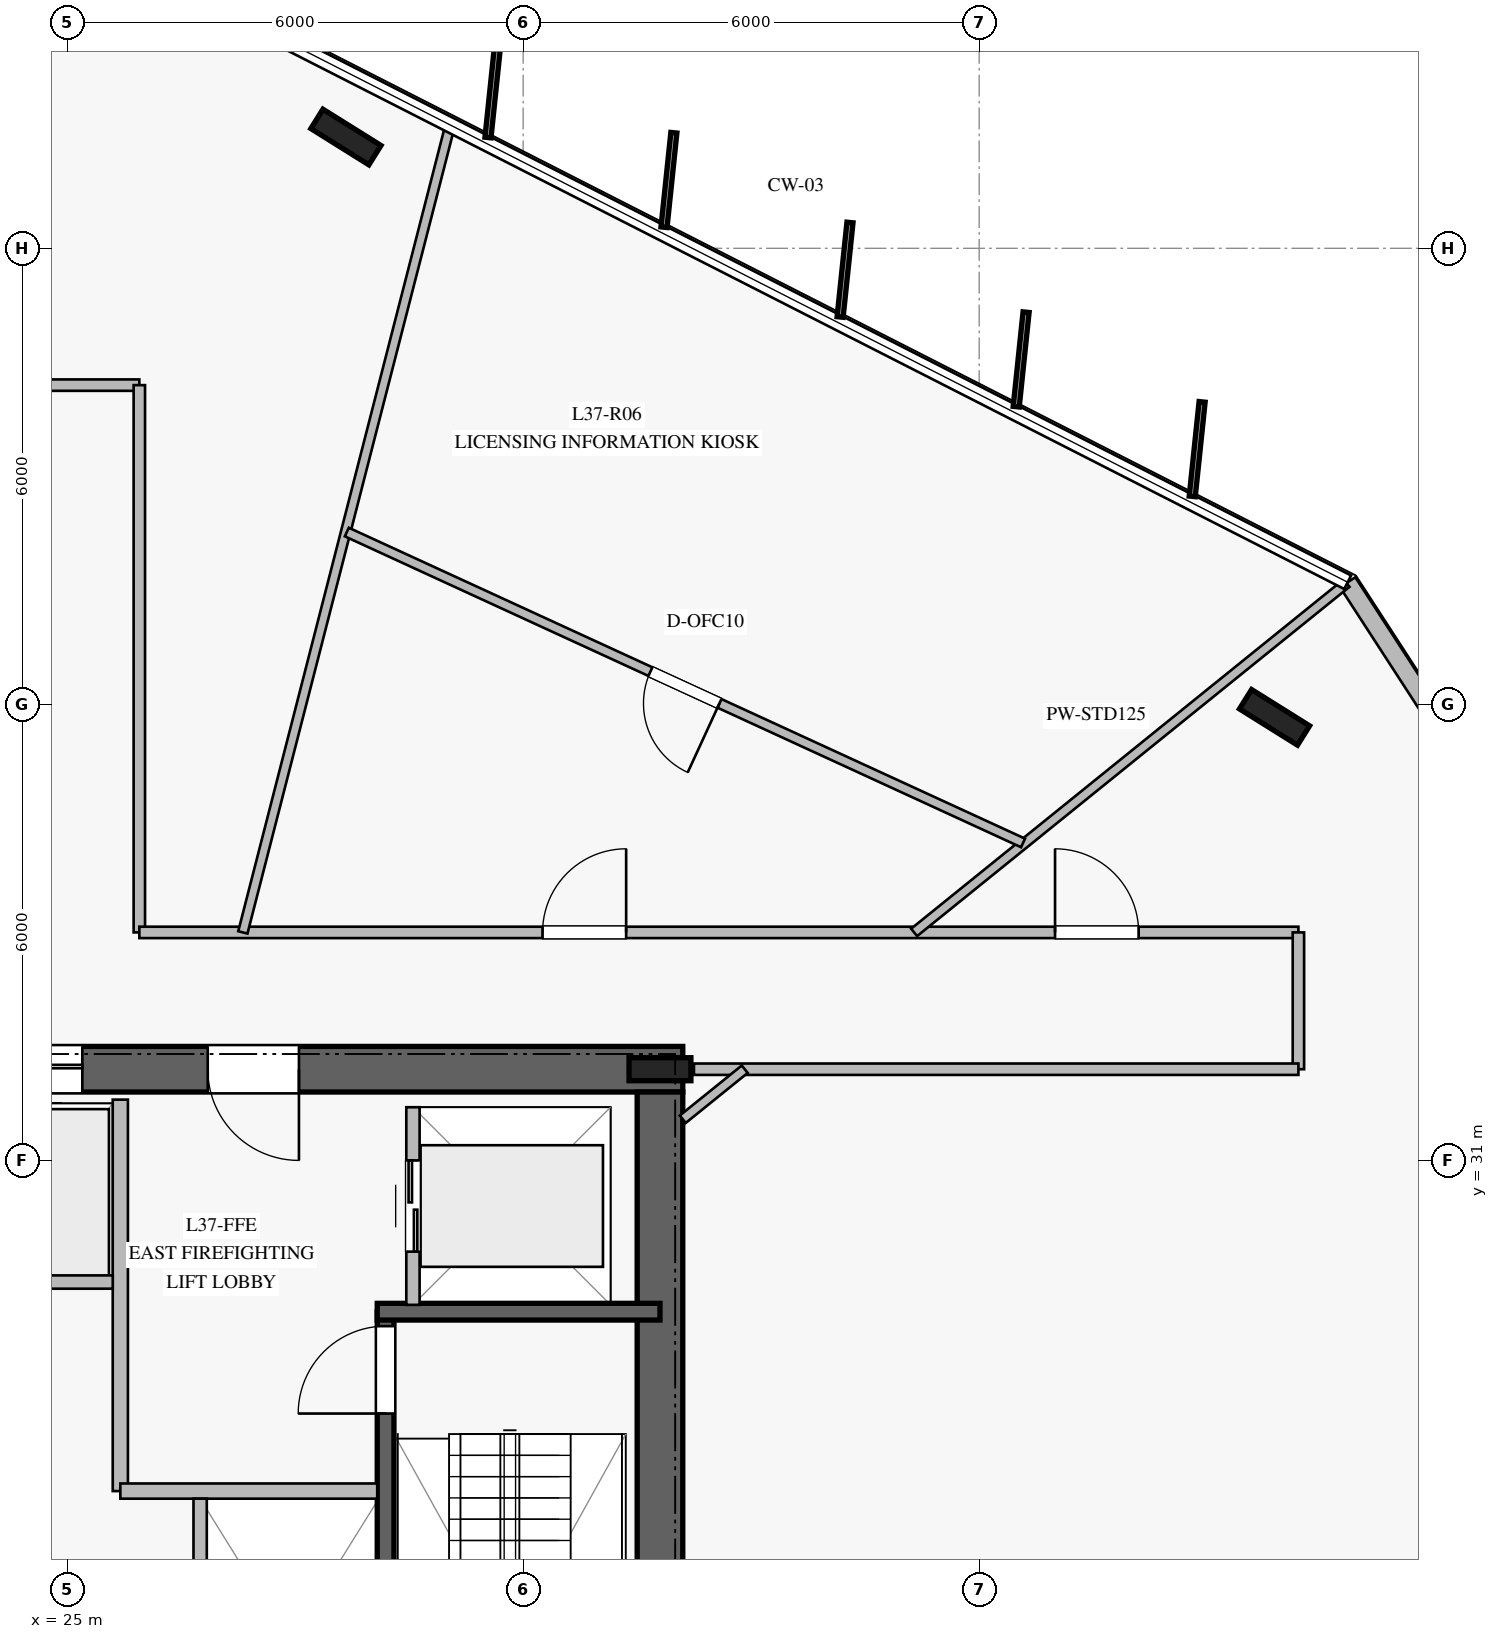
"""IFC4 building model, lengths in metres.
Left out: names, types, materials, properties, quantities, classifications, styles, units other than length and angle.
Written with IfcOpenShell. Run it as: python <this file> out.ifc"""

import sys

from ifc_helpers import new_model, si_unit, direction, frame, frame_2d, origin, origin_2d, place, context, subcontext, project, spatial, rectangle, i_section, extrude, element, fill, save


model = new_model("IFC4")
c1 = context("Model", 3, precision=1e-05, world=origin(), true_north=direction((0.0, 1.0)))
c2 = subcontext(c1, "Body", "Model", "MODEL_VIEW")
j1 = project(units=[si_unit("LENGTHUNIT", "METRE"), si_unit("PLANEANGLEUNIT", "RADIAN")], contexts=[c1])
p1 = place(None, origin())
s1 = spatial("IfcSite", under=j1, at=p1, CompositionType="ELEMENT")
p2 = place(p1, origin())
s2 = spatial("IfcBuilding", under=s1, at=p2, CompositionType="ELEMENT")
p3 = place(p2, frame((0.0, 0.0, 154.4)))
s3 = spatial("IfcBuildingStorey", under=s2, at=p3, CompositionType="ELEMENT", Elevation=154.4)
p4 = place(p3, frame((33.1, 32.2, 0.0), z_axis=(0.0, 0.0, 1.0), x_axis=(-1.0, 0.0, 0.0)))
e1 = element("IfcWall", 1, at=p4, inside=s3, PredefinedType="SHEAR", context=c2, shape_type="SweptSolid", body=[
    extrude(rectangle(XDim=16.2, YDim=0.6, at=frame_2d((8.1, 0.0))), origin(), (0.0, 0.0, 1.0), 3.76),
])
p5 = place(p4, frame((5.05, 0.0, 0.0)))
e2 = element("IfcOpeningElement", 2, at=p5, cuts=e1, PredefinedType="OPENING", context=c2, shape_type="SweptSolid", body=[
    extrude(rectangle(XDim=1.2, YDim=2.25, at=frame_2d((0.6, 1.125))), frame((0.0, 0.31, 0.0), z_axis=(0.0, -1.0, 0.0), x_axis=(1.0, 0.0, 0.0)), (0.0, 0.0, 1.0), 0.62),
])
p6 = place(p4, frame((11.85, 0.0, 0.0)))
e3 = element("IfcOpeningElement", 3, at=p6, cuts=e1, PredefinedType="OPENING", context=c2, shape_type="SweptSolid", body=[
    extrude(rectangle(XDim=1.1, YDim=2.2, at=frame_2d((0.55, 1.1))), frame((0.0, 0.31, 0.0), z_axis=(0.0, -1.0, 0.0), x_axis=(1.0, 0.0, 0.0)), (0.0, 0.0, 1.0), 0.62),
])
p7 = place(p4, frame((9.875, 0.0, 0.0)))
e4 = element("IfcOpeningElement", 4, at=p7, cuts=e1, PredefinedType="OPENING", context=c2, shape_type="SweptSolid", body=[
    extrude(rectangle(XDim=1.1, YDim=2.2, at=frame_2d((0.55, 1.1))), frame((0.0, 0.31, 0.0), z_axis=(0.0, -1.0, 0.0), x_axis=(1.0, 0.0, 0.0)), (0.0, 0.0, 1.0), 0.62),
])
p8 = place(p4, frame((7.9, 0.0, 0.0)))
e5 = element("IfcOpeningElement", 5, at=p8, cuts=e1, PredefinedType="OPENING", context=c2, shape_type="SweptSolid", body=[
    extrude(rectangle(XDim=1.1, YDim=2.2, at=frame_2d((0.55, 1.1))), frame((0.0, 0.31, 0.0), z_axis=(0.0, -1.0, 0.0), x_axis=(1.0, 0.0, 0.0)), (0.0, 0.0, 1.0), 0.62),
])
p9 = place(p3, frame((32.8, 18.1, 0.0), z_axis=(0.0, 0.0, 1.0), x_axis=(0.0, 1.0, 0.0)))
e6 = element("IfcWall", 6, at=p9, inside=s3, PredefinedType="SHEAR", context=c2, shape_type="SweptSolid", body=[
    extrude(rectangle(XDim=13.8, YDim=0.6, at=frame_2d((6.9, 0.0))), origin(), (0.0, 0.0, 1.0), 3.76),
])
p10 = place(p3, frame((32.8, 32.2, 0.0), z_axis=(0.0, 0.0, 1.0), x_axis=(1.0, 0.0, 0.0)))
e7 = element("IfcColumn", 7, at=p10, inside=s3, PredefinedType="COLUMN", context=c2, shape_type="SweptSolid", body=[
    extrude(i_section(OverallWidth=0.303, OverallDepth=0.814, WebThickness=0.021, FlangeThickness=0.04, at=origin_2d()), origin(), (0.0, 0.0, 1.0), 4.0),
])
p11 = place(p3, frame((29.19, 21.79, 0.0), z_axis=(0.0, 0.0, 1.0), x_axis=(0.0, 1.0, 0.0)))
e8 = element("IfcWall", 8, at=p11, inside=s3, PredefinedType="SOLIDWALL", context=c2, shape_type="SweptSolid", body=[
    extrude(rectangle(XDim=7.22, YDim=0.22, at=frame_2d((3.61, 0.0))), origin(), (0.0, 0.0, 1.0), 3.76),
])
p12 = place(p11, frame((5.88, 0.0, 0.0)))
e9 = element("IfcOpeningElement", 9, at=p12, cuts=e8, PredefinedType="OPENING", context=c2, shape_type="SweptSolid", body=[
    extrude(rectangle(XDim=1.15, YDim=2.2, at=frame_2d((0.575, 1.1))), frame((0.0, 0.12, 0.0), z_axis=(0.0, -1.0, 0.0), x_axis=(1.0, 0.0, 0.0)), (0.0, 0.0, 1.0), 0.24),
])
p13 = place(p3, frame((29.08, 29.01, 0.0), z_axis=(0.0, 0.0, 1.0), x_axis=(1.0, 0.0, 0.0)))
e10 = element("IfcWall", 10, at=p13, inside=s3, PredefinedType="SOLIDWALL", context=c2, shape_type="SweptSolid", body=[
    extrude(rectangle(XDim=3.72, YDim=0.22, at=frame_2d((1.86, 0.0))), origin(), (0.0, 0.0, 1.0), 3.76),
])
for number, where, z_axis, x_axis in (
    (11, (40.886, 36.829, 0.0), (0.0, 0.0, 1.0), (-0.848, 0.53, 0.0)),
    (12, (28.668, 44.464, 0.0), (0.0, 0.0, 1.0), (-0.848, 0.53, 0.0)),
):
    element("IfcColumn", number, at=place(p3, frame(where, z_axis=z_axis, x_axis=x_axis)), inside=s3, PredefinedType="COLUMN", context=c2, shape_type="SweptSolid", body=[
        extrude(i_section(OverallWidth=0.3, OverallDepth=0.9, WebThickness=0.019, FlangeThickness=0.035, at=origin_2d()), origin(), (0.0, 0.0, 1.0), 4.0),
    ])
p14 = place(p3, frame((44.282, 34.856, 0.0), z_axis=(0.0, 0.0, 1.0), x_axis=(-0.544351046129, 0.838857519832, 0.0)))
e13 = element("IfcWall", 13, at=p14, inside=s3, PredefinedType="STANDARD", context=c2, shape_type="SweptSolid", body=[
    extrude(rectangle(XDim=4.471, YDim=0.24, at=frame_2d((2.236, 0.0))), origin(), (0.0, 0.0, 1.0), 3.76),
])
p15 = place(p3, frame((25.7, 26.65, 0.0), z_axis=(0.0, 0.0, 1.0), x_axis=(0.0, 1.0, 0.0)))
e14 = element("IfcWall", 14, at=p15, inside=s3, PredefinedType="PARTITIONING", context=c2, shape_type="SweptSolid", body=[
    extrude(rectangle(XDim=5.15, YDim=0.2, at=frame_2d((2.575, 0.0))), origin(), (0.0, 0.0, 1.0), 3.76),
])
p16 = place(p3, frame((25.7, 26.65, 0.0), z_axis=(0.0, 0.0, 1.0), x_axis=(1.0, 0.0, 0.0)))
e15 = element("IfcWall", 15, at=p16, inside=s3, PredefinedType="PARTITIONING", context=c2, shape_type="SweptSolid", body=[
    extrude(rectangle(XDim=3.38, YDim=0.2, at=frame_2d((1.69, 0.0))), origin(), (0.0, 0.0, 1.0), 3.76),
])
for number, where, z_axis, x_axis in (
    (16, (23.7, 29.4, 0.0), (0.0, 0.0, 1.0), (1.0, 0.0, 0.0)),
    (17, (26.75, 24.65, 0.0), (0.0, 0.0, 1.0), (0.0, 1.0, 0.0)),
):
    element("IfcWall", number, at=place(p3, frame(where, z_axis=z_axis, x_axis=x_axis)), inside=s3, PredefinedType="PARTITIONING", context=c2, shape_type="SweptSolid", body=[
        extrude(rectangle(XDim=1.9, YDim=0.175, at=frame_2d((0.95, 0.0))), origin(), (0.0, 0.0, 1.0), 3.76),
    ])
p17 = place(p3, frame((29.55, 29.1, 0.0), z_axis=(0.0, 0.0, 1.0), x_axis=(0.0, 1.0, 0.0)))
e18 = element("IfcWall", 18, at=p17, inside=s3, PredefinedType="PARTITIONING", context=c2, shape_type="SweptSolid", body=[
    extrude(rectangle(XDim=2.6, YDim=0.175, at=frame_2d((1.3, 0.0))), origin(), (0.0, 0.0, 1.0), 3.76),
])
p18 = place(p17, frame((0.7, 0.0, 0.0)))
e19 = element("IfcOpeningElement", 19, at=p18, cuts=e18, PredefinedType="OPENING", context=c2, shape_type="SweptSolid", body=[
    extrude(rectangle(XDim=1.2, YDim=2.2, at=frame_2d((0.6, 1.1))), frame((0.0, 0.098, 0.0), z_axis=(0.0, -1.0, 0.0), x_axis=(1.0, 0.0, 0.0)), (0.0, 0.0, 1.0), 0.195),
])
p19 = place(p3, frame((24.05, 41.2, 0.0), z_axis=(0.0, 0.0, 1.0), x_axis=(1.0, 0.0, 0.0)))
e20 = element("IfcWall", 20, at=p19, inside=s3, PredefinedType="PARTITIONING", context=c2, shape_type="SweptSolid", body=[
    extrude(rectangle(XDim=1.9, YDim=0.15, at=frame_2d((0.95, 0.0))), origin(), (0.0, 0.0, 1.0), 3.76),
])
p20 = place(p3, frame((25.95, 41.2, 0.0), z_axis=(0.0, 0.0, 1.0), x_axis=(0.0, -1.0, 0.0)))
e21 = element("IfcWall", 21, at=p20, inside=s3, PredefinedType="PARTITIONING", context=c2, shape_type="SweptSolid", body=[
    extrude(rectangle(XDim=7.2, YDim=0.15, at=frame_2d((3.6, 0.0))), origin(), (0.0, 0.0, 1.0), 3.36),
])
p21 = place(p3, frame((25.95, 34.0, 0.0), z_axis=(0.0, 0.0, 1.0), x_axis=(1.0, 0.0, 0.0)))
e22 = element("IfcWall", 22, at=p21, inside=s3, PredefinedType="PARTITIONING", context=c2, shape_type="SweptSolid", body=[
    extrude(rectangle(XDim=15.25, YDim=0.15, at=frame_2d((7.625, 0.0))), origin(), (0.0, 0.0, 1.0), 3.21),
])
p22 = place(p21, frame((12.048, 0.0, 0.0)))
e23 = element("IfcOpeningElement", 23, at=p22, cuts=e22, PredefinedType="OPENING", context=c2, shape_type="SweptSolid", body=[
    extrude(rectangle(XDim=1.1, YDim=2.2, at=frame_2d((0.55, 1.1))), frame((0.0, 0.085, 0.0), z_axis=(0.0, -1.0, 0.0), x_axis=(1.0, 0.0, 0.0)), (0.0, 0.0, 1.0), 0.17),
])
p23 = place(p21, frame((5.305, 0.0, 0.0)))
e24 = element("IfcOpeningElement", 24, at=p23, cuts=e22, PredefinedType="OPENING", context=c2, shape_type="SweptSolid", body=[
    extrude(rectangle(XDim=1.1, YDim=2.2, at=frame_2d((0.55, 1.1))), frame((0.0, 0.085, 0.0), z_axis=(0.0, -1.0, 0.0), x_axis=(1.0, 0.0, 0.0)), (0.0, 0.0, 1.0), 0.17),
])
p24 = place(p3, frame((41.2, 34.0, 0.0), z_axis=(0.0, 0.0, 1.0), x_axis=(0.0, -1.0, 0.0)))
e25 = element("IfcWall", 25, at=p24, inside=s3, PredefinedType="PARTITIONING", context=c2, shape_type="SweptSolid", body=[
    extrude(rectangle(XDim=1.8, YDim=0.15, at=frame_2d((0.9, 0.0))), origin(), (0.0, 0.0, 1.0), 3.76),
])
p25 = place(p3, frame((41.2, 32.2, 0.0), z_axis=(0.0, 0.0, 1.0), x_axis=(-1.0, 0.0, 0.0)))
e26 = element("IfcWall", 26, at=p25, inside=s3, PredefinedType="PARTITIONING", context=c2, shape_type="SweptSolid", body=[
    extrude(rectangle(XDim=7.953, YDim=0.15, at=frame_2d((3.977, 0.0))), origin(), (0.0, 0.0, 1.0), 3.21),
])
p26 = place(p3, frame((33.1, 31.542, 0.0), z_axis=(0.0, 0.0, 1.0), x_axis=(0.778063867774, 0.628185177846, 0.0)))
e27 = element("IfcWall", 27, at=p26, inside=s3, PredefinedType="PARTITIONING", context=c2, shape_type="SweptSolid", body=[
    extrude(rectangle(XDim=1.047, YDim=0.125, at=frame_2d((0.524, 0.0))), origin(), (0.0, 0.0, 1.0), 3.21),
])
p27 = place(p3, frame((36.144, 34.0, 0.0), z_axis=(0.0, 0.0, 1.0), x_axis=(0.777938669593, 0.62834021545, 0.0)))
e28 = element("IfcWall", 28, at=p27, inside=s3, PredefinedType="PARTITIONING", context=c2, shape_type="SweptSolid", body=[
    extrude(rectangle(XDim=7.313, YDim=0.125, at=frame_2d((3.656, 0.0))), origin(), (0.0, 0.0, 1.0), 3.16),
])
p28 = place(p3, frame((27.312, 34.0, 0.0), z_axis=(0.0, 0.0, 1.0), x_axis=(0.248752431695, 0.96856710027, 0.0)))
e29 = element("IfcWall", 29, at=p28, inside=s3, PredefinedType="PARTITIONING", context=c2, shape_type="SweptSolid", body=[
    extrude(rectangle(XDim=10.95, YDim=0.125, at=frame_2d((5.475, 0.0))), origin(), (0.0, 0.0, 1.0), 3.16),
])
p29 = place(p3, frame((37.577, 35.177, 0.0), z_axis=(0.0, 0.0, 1.0), x_axis=(-0.908588116284, 0.417693230671, 0.0)))
e30 = element("IfcWall", 30, at=p29, inside=s3, PredefinedType="PARTITIONING", context=c2, shape_type="SweptSolid", body=[
    extrude(rectangle(XDim=9.792, YDim=0.125, at=frame_2d((4.896, 0.0))), origin(), (0.0, 0.0, 1.0), 3.21),
])
p30 = place(p29, frame((4.396, 0.0, 0.0)))
e31 = element("IfcOpeningElement", 31, at=p30, cuts=e30, PredefinedType="OPENING", context=c2, shape_type="SweptSolid", body=[
    extrude(rectangle(XDim=1.0, YDim=2.15, at=frame_2d((0.5, 1.075))), frame((0.0, 0.073, 0.0), z_axis=(0.0, -1.0, 0.0), x_axis=(1.0, 0.0, 0.0)), (0.0, 0.0, 1.0), 0.145),
])
p31 = place(p12, origin())
e32 = element("IfcDoor", 32, at=p31, inside=s3, OperationType="SINGLE_SWING_LEFT", PredefinedType="DOOR", context=c2, shape_type="SweptSolid", body=[
    extrude(rectangle(XDim=1.15, YDim=2.2, at=frame_2d((0.575, 1.1))), frame((0.0, 0.025, 0.0), z_axis=(0.0, -1.0, 0.0), x_axis=(1.0, 0.0, 0.0)), (0.0, 0.0, 1.0), 0.05),
])
fill(e9, e32)
p32 = place(p5, origin())
e33 = element("IfcDoor", 33, at=p32, inside=s3, OperationType="SINGLE_SWING_LEFT", PredefinedType="DOOR", context=c2, shape_type="SweptSolid", body=[
    extrude(rectangle(XDim=1.2, YDim=2.25, at=frame_2d((0.6, 1.125))), frame((0.0, 0.025, 0.0), z_axis=(0.0, -1.0, 0.0), x_axis=(1.0, 0.0, 0.0)), (0.0, 0.0, 1.0), 0.05),
])
fill(e2, e33)
p33 = place(p8, origin())
e34 = element("IfcDoor", 34, at=p33, inside=s3, OperationType="DOUBLE_DOOR_SLIDING", PredefinedType="DOOR", context=c2, shape_type="SweptSolid", body=[
    extrude(rectangle(XDim=1.1, YDim=2.2, at=frame_2d((0.55, 1.1))), frame((0.0, 0.025, 0.0), z_axis=(0.0, -1.0, 0.0), x_axis=(1.0, 0.0, 0.0)), (0.0, 0.0, 1.0), 0.05),
])
fill(e5, e34)
p34 = place(p18, origin())
e35 = element("IfcDoor", 35, at=p34, inside=s3, OperationType="DOUBLE_DOOR_SLIDING", PredefinedType="DOOR", context=c2, shape_type="SweptSolid", body=[
    extrude(rectangle(XDim=1.2, YDim=2.2, at=frame_2d((0.6, 1.1))), frame((0.0, 0.025, 0.0), z_axis=(0.0, -1.0, 0.0), x_axis=(1.0, 0.0, 0.0)), (0.0, 0.0, 1.0), 0.05),
])
fill(e19, e35)
p35 = place(p22, origin())
e36 = element("IfcDoor", 36, at=p35, inside=s3, OperationType="SINGLE_SWING_LEFT", PredefinedType="DOOR", context=c2, shape_type="SweptSolid", body=[
    extrude(rectangle(XDim=1.1, YDim=2.2, at=frame_2d((0.55, 1.1))), frame((0.0, 0.025, 0.0), z_axis=(0.0, -1.0, 0.0), x_axis=(1.0, 0.0, 0.0)), (0.0, 0.0, 1.0), 0.05),
])
fill(e23, e36)
p36 = place(p23, origin())
e37 = element("IfcDoor", 37, at=p36, inside=s3, OperationType="SINGLE_SWING_RIGHT", PredefinedType="DOOR", context=c2, shape_type="SweptSolid", body=[
    extrude(rectangle(XDim=1.1, YDim=2.2, at=frame_2d((0.55, 1.1))), frame((0.0, 0.025, 0.0), z_axis=(0.0, -1.0, 0.0), x_axis=(1.0, 0.0, 0.0)), (0.0, 0.0, 1.0), 0.05),
])
fill(e24, e37)
p37 = place(p30, origin())
e38 = element("IfcDoor", 38, at=p37, inside=s3, OperationType="SINGLE_SWING_LEFT", PredefinedType="DOOR", context=c2, shape_type="SweptSolid", body=[
    extrude(rectangle(XDim=1.0, YDim=2.15, at=frame_2d((0.5, 1.075))), frame((0.0, 0.025, 0.0), z_axis=(0.0, -1.0, 0.0), x_axis=(1.0, 0.0, 0.0)), (0.0, 0.0, 1.0), 0.05),
])
fill(e31, e38)
save(model, sys.argv[1])
